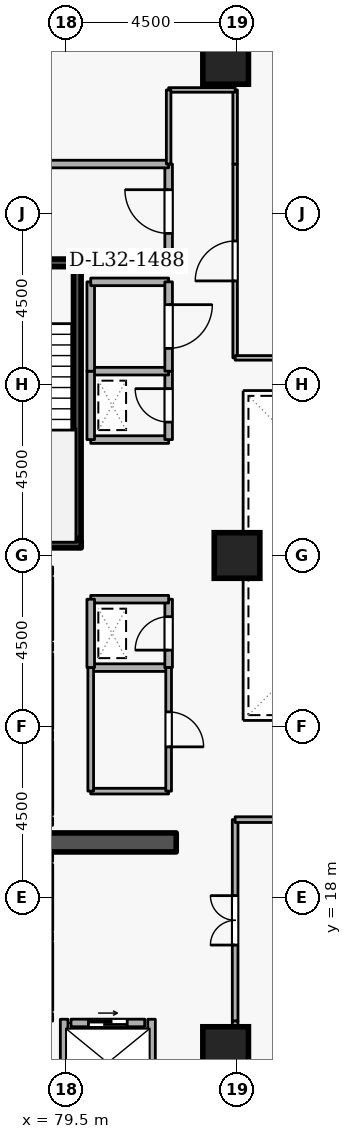
"""IFC4 building model, lengths in metres.
Left out: names, types, materials, properties, quantities, classifications, styles, units other than length and angle.
Written with IfcOpenShell. Run it as: python <this file> out.ifc"""

import sys

from ifc_helpers import new_model, si_unit, direction, frame, frame_2d, origin, origin_2d, place, context, subcontext, project, spatial, rectangle, extrude, element, fill, save


model = new_model("IFC4")
c1 = context("Model", 3, precision=1e-05, world=origin(), true_north=direction((0.0, 1.0)))
c2 = subcontext(c1, "Body", "Model", "MODEL_VIEW")
j1 = project(units=[si_unit("LENGTHUNIT", "METRE"), si_unit("PLANEANGLEUNIT", "RADIAN")], contexts=[c1])
p1 = place(None, origin())
s1 = spatial("IfcSite", under=j1, at=p1, CompositionType="ELEMENT")
p2 = place(p1, origin())
s2 = spatial("IfcBuilding", under=s1, at=p2, CompositionType="ELEMENT")
p3 = place(p2, frame((0.0, 0.0, 123.3)))
s3 = spatial("IfcBuildingStorey", under=s2, at=p3, CompositionType="ELEMENT", Elevation=123.3)
p4 = place(p3, frame((76.6, 19.45, 0.0), z_axis=(0.0, 0.0, 1.0), x_axis=(1.0, 0.0, 0.0)))
e1 = element("IfcWall", 1, at=p4, inside=s3, PredefinedType="SHEAR", context=c2, shape_type="SweptSolid", body=[
    extrude(rectangle(XDim=5.8, YDim=0.5, at=frame_2d((2.9, 0.0))), origin(), (0.0, 0.0, 1.0), 3.6),
])
for number, where, z_axis, x_axis in (
    (2, (83.7, 14.0, 0.0), (0.0, 0.0, 1.0), (1.0, 0.0, 0.0)),
    (3, (83.7, 40.0, 0.0), (0.0, 0.0, 1.0), (1.0, 0.0, 0.0)),
    (4, (84.0, 27.0, 0.0), (0.0, 0.0, 1.0), (1.0, 0.0, 0.0)),
):
    element("IfcColumn", number, at=place(p3, frame(where, z_axis=z_axis, x_axis=x_axis)), inside=s3, PredefinedType="COLUMN", context=c2, shape_type="SweptSolid", body=[
        extrude(rectangle(XDim=1.2, YDim=1.2, at=origin_2d()), origin(), (0.0, 0.0, 1.0), 3.6),
    ])
p5 = place(p3, frame((79.05, 24.78, 0.0), z_axis=(0.0, 0.0, 1.0), x_axis=(0.0, 1.0, 0.0)))
e5 = element("IfcWall", 5, at=p5, inside=s3, PredefinedType="STANDARD", context=c2, shape_type="SweptSolid", body=[
    extrude(rectangle(XDim=1.64, YDim=0.2, at=frame_2d((0.82, 0.0))), origin(), (0.0, 0.0, 1.0), 3.34),
])
p6 = place(p5, frame((0.31, 0.0, 0.0)))
e6 = element("IfcOpeningElement", 6, at=p6, cuts=e5, PredefinedType="OPENING", context=c2, shape_type="SweptSolid", body=[
    extrude(rectangle(XDim=1.02, YDim=2.06, at=frame_2d((0.51, 1.03))), frame((0.0, 0.11, 0.0), z_axis=(0.0, -1.0, 0.0), x_axis=(1.0, 0.0, 0.0)), (0.0, 0.0, 1.0), 0.22),
])
p7 = place(p3, frame((79.05, 22.43, 0.0), z_axis=(0.0, 0.0, 1.0), x_axis=(0.0, 1.0, 0.0)))
e7 = element("IfcWall", 7, at=p7, inside=s3, PredefinedType="STANDARD", context=c2, shape_type="SweptSolid", body=[
    extrude(rectangle(XDim=1.99, YDim=0.2, at=frame_2d((0.995, 0.0))), origin(), (0.0, 0.0, 1.0), 3.34),
])
p8 = place(p3, frame((79.05, 20.18, 0.0), z_axis=(0.0, 0.0, 1.0), x_axis=(0.0, 1.0, 0.0)))
e8 = element("IfcWall", 8, at=p8, inside=s3, PredefinedType="STANDARD", context=c2, shape_type="SweptSolid", body=[
    extrude(rectangle(XDim=1.94, YDim=0.2, at=frame_2d((0.97, 0.0))), origin(), (0.0, 0.0, 1.0), 3.34),
])
p9 = place(p3, frame((79.05, 17.13, 0.0), z_axis=(0.0, 0.0, 1.0), x_axis=(0.0, 1.0, 0.0)))
e9 = element("IfcWall", 9, at=p9, inside=s3, PredefinedType="STANDARD", context=c2, shape_type="SweptSolid", body=[
    extrude(rectangle(XDim=1.74, YDim=0.2, at=frame_2d((0.87, 0.0))), origin(), (0.0, 0.0, 1.0), 3.34),
])
p10 = place(p9, frame((0.36, 0.0, 0.0)))
e10 = element("IfcOpeningElement", 10, at=p10, cuts=e9, PredefinedType="OPENING", context=c2, shape_type="SweptSolid", body=[
    extrude(rectangle(XDim=1.02, YDim=2.06, at=frame_2d((0.51, 1.03))), frame((0.0, 0.11, 0.0), z_axis=(0.0, -1.0, 0.0), x_axis=(1.0, 0.0, 0.0)), (0.0, 0.0, 1.0), 0.22),
])
p11 = place(p3, frame((79.05, 15.03, 0.0), z_axis=(0.0, 0.0, 1.0), x_axis=(0.0, 1.0, 0.0)))
e11 = element("IfcWall", 11, at=p11, inside=s3, PredefinedType="STANDARD", context=c2, shape_type="SweptSolid", body=[
    extrude(rectangle(XDim=1.79, YDim=0.2, at=frame_2d((0.895, 0.0))), origin(), (0.0, 0.0, 1.0), 3.34),
])
p12 = place(p11, frame((0.385, 0.0, 0.0)))
e12 = element("IfcOpeningElement", 12, at=p12, cuts=e11, PredefinedType="OPENING", context=c2, shape_type="SweptSolid", body=[
    extrude(rectangle(XDim=1.02, YDim=2.06, at=frame_2d((0.51, 1.03))), frame((0.0, 0.11, 0.0), z_axis=(0.0, -1.0, 0.0), x_axis=(1.0, 0.0, 0.0)), (0.0, 0.0, 1.0), 0.22),
])
p13 = place(p3, frame((79.63, 14.7, 0.0), z_axis=(0.0, 0.0, 1.0), x_axis=(1.0, 0.0, 0.0)))
e13 = element("IfcWall", 13, at=p13, inside=s3, PredefinedType="STANDARD", context=c2, shape_type="SweptSolid", body=[
    extrude(rectangle(XDim=1.94, YDim=0.2, at=frame_2d((0.97, 0.0))), origin(), (0.0, 0.0, 1.0), 3.34),
])
p14 = place(p13, frame((0.46, 0.0, 0.0)))
e14 = element("IfcOpeningElement", 14, at=p14, cuts=e13, PredefinedType="OPENING", context=c2, shape_type="SweptSolid", body=[
    extrude(rectangle(XDim=1.02, YDim=2.06, at=frame_2d((0.51, 1.03))), frame((0.0, 0.11, 0.0), z_axis=(0.0, -1.0, 0.0), x_axis=(1.0, 0.0, 0.0)), (0.0, 0.0, 1.0), 0.22),
])
for number, where, z_axis, x_axis in (
    (15, (81.75, 12.612, 0.0), (0.0, 0.0, 1.0), (0.0, 1.0, 0.0)),
    (16, (79.45, 12.612, 0.0), (0.0, 0.0, 1.0), (0.0, 1.0, 0.0)),
):
    element("IfcWall", number, at=place(p3, frame(where, z_axis=z_axis, x_axis=x_axis)), inside=s3, PredefinedType="STANDARD", context=c2, shape_type="SweptSolid", body=[
        extrude(rectangle(XDim=2.186, YDim=0.2, at=frame_2d((1.093, 0.0))), origin(), (0.0, 0.0, 1.0), 3.34),
    ])
p15 = place(p3, frame((76.55, 34.7, 0.0), z_axis=(0.0, 0.0, 1.0), x_axis=(1.0, 0.0, 0.0)))
e17 = element("IfcWall", 17, at=p15, inside=s3, PredefinedType="SHEAR", context=c2, shape_type="SweptSolid", body=[
    extrude(rectangle(XDim=3.35, YDim=0.2, at=frame_2d((1.675, 0.0))), origin(), (0.0, 0.0, 1.0), 3.6),
])
p16 = place(p15, frame((1.125, 0.0, 0.0)))
e18 = element("IfcOpeningElement", 18, at=p16, cuts=e17, PredefinedType="OPENING", context=c2, shape_type="SweptSolid", body=[
    extrude(rectangle(XDim=1.1, YDim=2.1, at=frame_2d((0.55, 1.05))), frame((0.0, 0.11, 0.0), z_axis=(0.0, -1.0, 0.0), x_axis=(1.0, 0.0, 0.0)), (0.0, 0.0, 1.0), 0.22),
])
p17 = place(p3, frame((79.9, 27.3, 0.0), z_axis=(0.0, 0.0, 1.0), x_axis=(-1.0, 0.0, 0.0)))
e19 = element("IfcWall", 19, at=p17, inside=s3, PredefinedType="SHEAR", context=c2, shape_type="SweptSolid", body=[
    extrude(rectangle(XDim=3.35, YDim=0.2, at=frame_2d((1.675, 0.0))), origin(), (0.0, 0.0, 1.0), 3.6),
])
p18 = place(p3, frame((79.797, 27.45, 0.0), z_axis=(0.0, 0.0, 1.0), x_axis=(0.0, 1.0, 0.0)))
e20 = element("IfcWall", 20, at=p18, inside=s3, PredefinedType="SHEAR", context=c2, shape_type="SweptSolid", body=[
    extrude(rectangle(XDim=7.1, YDim=0.2, at=frame_2d((3.55, 0.0))), origin(), (0.0, 0.0, 1.0), 3.6),
])
p19 = place(p3, frame((79.9, 34.8, 0.0), z_axis=(0.0, 0.0, 1.0), x_axis=(1.0, 0.0, 0.0)))
e21 = element("IfcWall", 21, at=p19, inside=s3, PredefinedType="STANDARD", context=c2, shape_type="SweptSolid", body=[
    extrude(rectangle(XDim=2.3, YDim=0.2, at=frame_2d((1.15, 0.0))), origin(), (0.0, 0.0, 1.0), 2.545),
])
p20 = place(p3, frame((82.2, 34.8, 0.0), z_axis=(0.0, 0.0, 1.0), x_axis=(0.0, 1.0, 0.0)))
e22 = element("IfcWall", 22, at=p20, inside=s3, PredefinedType="STANDARD", context=c2, shape_type="SweptSolid", body=[
    extrude(rectangle(XDim=2.5, YDim=0.2, at=frame_2d((1.25, 0.0))), origin(), (0.0, 0.0, 1.0), 3.34),
])
p21 = place(p20, frame((0.675, 0.0, 0.0)))
e23 = element("IfcOpeningElement", 23, at=p21, cuts=e22, PredefinedType="OPENING", context=c2, shape_type="SweptSolid", body=[
    extrude(rectangle(XDim=1.15, YDim=2.1, at=frame_2d((0.575, 1.05))), frame((0.0, 0.11, 0.0), z_axis=(0.0, -1.0, 0.0), x_axis=(1.0, 0.0, 0.0)), (0.0, 0.0, 1.0), 0.22),
])
p22 = place(p3, frame((82.2, 37.3, 0.0), z_axis=(0.0, 0.0, 1.0), x_axis=(-1.0, 0.0, 0.0)))
e24 = element("IfcWall", 24, at=p22, inside=s3, PredefinedType="STANDARD", context=c2, shape_type="SweptSolid", body=[
    extrude(rectangle(XDim=5.7, YDim=0.2, at=frame_2d((2.85, 0.0))), origin(), (0.0, 0.0, 1.0), 3.34),
])
p23 = place(p3, frame((80.15, 24.05, 0.0), z_axis=(0.0, 0.0, 1.0), x_axis=(1.0, 0.0, 0.0)))
e25 = element("IfcWall", 25, at=p23, inside=s3, PredefinedType="STANDARD", context=c2, shape_type="SweptSolid", body=[
    extrude(rectangle(XDim=2.05, YDim=0.2, at=frame_2d((1.025, 0.0))), origin(), (0.0, 0.0, 1.0), 3.34),
])
p24 = place(p3, frame((82.2, 24.05, 0.0), z_axis=(0.0, 0.0, 1.0), x_axis=(0.0, 1.0, 0.0)))
e26 = element("IfcWall", 26, at=p24, inside=s3, PredefinedType="STANDARD", context=c2, shape_type="SweptSolid", body=[
    extrude(rectangle(XDim=1.8, YDim=0.2, at=frame_2d((0.9, 0.0))), origin(), (0.0, 0.0, 1.0), 3.34),
])
p25 = place(p24, frame((0.46, 0.0, 0.0)))
e27 = element("IfcOpeningElement", 27, at=p25, cuts=e26, PredefinedType="OPENING", context=c2, shape_type="SweptSolid", body=[
    extrude(rectangle(XDim=0.88, YDim=2.04, at=frame_2d((0.44, 1.02))), frame((0.0, 0.11, 0.0), z_axis=(0.0, -1.0, 0.0), x_axis=(1.0, 0.0, 0.0)), (0.0, 0.0, 1.0), 0.22),
])
p26 = place(p3, frame((82.2, 25.85, 0.0), z_axis=(0.0, 0.0, 1.0), x_axis=(-1.0, 0.0, 0.0)))
e28 = element("IfcWall", 28, at=p26, inside=s3, PredefinedType="STANDARD", context=c2, shape_type="SweptSolid", body=[
    extrude(rectangle(XDim=2.05, YDim=0.2, at=frame_2d((1.025, 0.0))), origin(), (0.0, 0.0, 1.0), 3.34),
])
p27 = place(p3, frame((80.15, 25.85, 0.0), z_axis=(0.0, 0.0, 1.0), x_axis=(0.0, -1.0, 0.0)))
e29 = element("IfcWall", 29, at=p27, inside=s3, PredefinedType="STANDARD", context=c2, shape_type="SweptSolid", body=[
    extrude(rectangle(XDim=1.8, YDim=0.2, at=frame_2d((0.9, 0.0))), origin(), (0.0, 0.0, 1.0), 3.34),
])
p28 = place(p3, frame((80.15, 30.05, 0.0), z_axis=(0.0, 0.0, 1.0), x_axis=(1.0, 0.0, 0.0)))
e30 = element("IfcWall", 30, at=p28, inside=s3, PredefinedType="STANDARD", context=c2, shape_type="SweptSolid", body=[
    extrude(rectangle(XDim=2.05, YDim=0.2, at=frame_2d((1.025, 0.0))), origin(), (0.0, 0.0, 1.0), 3.34),
])
p29 = place(p3, frame((82.2, 30.05, 0.0), z_axis=(0.0, 0.0, 1.0), x_axis=(0.0, 1.0, 0.0)))
e31 = element("IfcWall", 31, at=p29, inside=s3, PredefinedType="STANDARD", context=c2, shape_type="SweptSolid", body=[
    extrude(rectangle(XDim=1.8, YDim=0.2, at=frame_2d((0.9, 0.0))), origin(), (0.0, 0.0, 1.0), 3.34),
])
p30 = place(p29, frame((0.46, 0.0, 0.0)))
e32 = element("IfcOpeningElement", 32, at=p30, cuts=e31, PredefinedType="OPENING", context=c2, shape_type="SweptSolid", body=[
    extrude(rectangle(XDim=0.88, YDim=2.04, at=frame_2d((0.44, 1.02))), frame((0.0, 0.11, 0.0), z_axis=(0.0, -1.0, 0.0), x_axis=(1.0, 0.0, 0.0)), (0.0, 0.0, 1.0), 0.22),
])
p31 = place(p3, frame((82.2, 31.85, 0.0), z_axis=(0.0, 0.0, 1.0), x_axis=(-1.0, 0.0, 0.0)))
e33 = element("IfcWall", 33, at=p31, inside=s3, PredefinedType="STANDARD", context=c2, shape_type="SweptSolid", body=[
    extrude(rectangle(XDim=2.05, YDim=0.2, at=frame_2d((1.025, 0.0))), origin(), (0.0, 0.0, 1.0), 3.34),
])
p32 = place(p3, frame((80.15, 31.85, 0.0), z_axis=(0.0, 0.0, 1.0), x_axis=(0.0, -1.0, 0.0)))
e34 = element("IfcWall", 34, at=p32, inside=s3, PredefinedType="STANDARD", context=c2, shape_type="SweptSolid", body=[
    extrude(rectangle(XDim=1.8, YDim=0.2, at=frame_2d((0.9, 0.0))), origin(), (0.0, 0.0, 1.0), 3.34),
])
p33 = place(p3, frame((80.15, 31.85, 0.0), z_axis=(0.0, 0.0, 1.0), x_axis=(0.0, 1.0, 0.0)))
e35 = element("IfcWall", 35, at=p33, inside=s3, PredefinedType="STANDARD", context=c2, shape_type="SweptSolid", body=[
    extrude(rectangle(XDim=2.35, YDim=0.2, at=frame_2d((1.175, 0.0))), origin(), (0.0, 0.0, 1.0), 3.34),
])
p34 = place(p3, frame((80.15, 34.2, 0.0), z_axis=(0.0, 0.0, 1.0), x_axis=(1.0, 0.0, 0.0)))
e36 = element("IfcWall", 36, at=p34, inside=s3, PredefinedType="STANDARD", context=c2, shape_type="SweptSolid", body=[
    extrude(rectangle(XDim=2.05, YDim=0.2, at=frame_2d((1.025, 0.0))), origin(), (0.0, 0.0, 1.0), 2.545),
])
p35 = place(p3, frame((82.2, 34.2, 0.0), z_axis=(0.0, 0.0, 1.0), x_axis=(0.0, -1.0, 0.0)))
e37 = element("IfcWall", 37, at=p35, inside=s3, PredefinedType="STANDARD", context=c2, shape_type="SweptSolid", body=[
    extrude(rectangle(XDim=2.35, YDim=0.2, at=frame_2d((1.175, 0.0))), origin(), (0.0, 0.0, 1.0), 3.34),
])
p36 = place(p35, frame((0.6, 0.0, 0.0)))
e38 = element("IfcOpeningElement", 38, at=p36, cuts=e37, PredefinedType="OPENING", context=c2, shape_type="SweptSolid", body=[
    extrude(rectangle(XDim=1.15, YDim=2.1, at=frame_2d((0.575, 1.05))), frame((0.0, 0.11, 0.0), z_axis=(0.0, -1.0, 0.0), x_axis=(1.0, 0.0, 0.0)), (0.0, 0.0, 1.0), 0.22),
])
p37 = place(p3, frame((82.2, 20.8, 0.0), z_axis=(0.0, 0.0, 1.0), x_axis=(-1.0, 0.0, 0.0)))
e39 = element("IfcWall", 39, at=p37, inside=s3, PredefinedType="PARTITIONING", context=c2, shape_type="SweptSolid", body=[
    extrude(rectangle(XDim=2.05, YDim=0.15, at=frame_2d((1.025, 0.0))), origin(), (0.0, 0.0, 1.0), 3.34),
])
p38 = place(p3, frame((80.15, 20.8, 0.0), z_axis=(0.0, 0.0, 1.0), x_axis=(0.0, 1.0, 0.0)))
e40 = element("IfcWall", 40, at=p38, inside=s3, PredefinedType="PARTITIONING", context=c2, shape_type="SweptSolid", body=[
    extrude(rectangle(XDim=3.25, YDim=0.15, at=frame_2d((1.625, 0.0))), origin(), (0.0, 0.0, 1.0), 3.34),
])
p39 = place(p3, frame((82.2, 24.05, 0.0), z_axis=(0.0, 0.0, 1.0), x_axis=(0.0, -1.0, 0.0)))
e41 = element("IfcWall", 41, at=p39, inside=s3, PredefinedType="PARTITIONING", context=c2, shape_type="SweptSolid", body=[
    extrude(rectangle(XDim=3.25, YDim=0.15, at=frame_2d((1.625, 0.0))), origin(), (0.0, 0.0, 1.0), 3.34),
])
p40 = place(p39, frame((1.165, 0.0, 0.0)))
e42 = element("IfcOpeningElement", 42, at=p40, cuts=e41, PredefinedType="OPENING", context=c2, shape_type="SweptSolid", body=[
    extrude(rectangle(XDim=0.92, YDim=2.08, at=frame_2d((0.46, 1.04))), frame((0.0, 0.085, 0.0), z_axis=(0.0, -1.0, 0.0), x_axis=(1.0, 0.0, 0.0)), (0.0, 0.0, 1.0), 0.17),
])
p41 = place(p3, frame((83.95, 14.75, 0.0), z_axis=(0.0, 0.0, 1.0), x_axis=(0.0, 1.0, 0.0)))
e43 = element("IfcWall", 43, at=p41, inside=s3, PredefinedType="PARTITIONING", context=c2, shape_type="SweptSolid", body=[
    extrude(rectangle(XDim=5.3, YDim=0.15, at=frame_2d((2.65, 0.0))), origin(), (0.0, 0.0, 1.0), 3.34),
])
p42 = place(p41, frame((2.0, 0.0, 0.0)))
e44 = element("IfcOpeningElement", 44, at=p42, cuts=e43, PredefinedType="OPENING", context=c2, shape_type="SweptSolid", body=[
    extrude(rectangle(XDim=1.3, YDim=2.12, at=frame_2d((0.65, 1.06))), frame((0.0, 0.085, 0.0), z_axis=(0.0, -1.0, 0.0), x_axis=(1.0, 0.0, 0.0)), (0.0, 0.0, 1.0), 0.17),
])
p43 = place(p3, frame((83.95, 20.05, 0.0), z_axis=(0.0, 0.0, 1.0), x_axis=(1.0, 0.0, 0.0)))
e45 = element("IfcWall", 45, at=p43, inside=s3, PredefinedType="PARTITIONING", context=c2, shape_type="SweptSolid", body=[
    extrude(rectangle(XDim=4.55, YDim=0.15, at=frame_2d((2.275, 0.0))), origin(), (0.0, 0.0, 1.0), 3.34),
])
p44 = place(p3, frame((83.95, 12.4, 0.0), z_axis=(0.0, 0.0, 1.0), x_axis=(0.0, 1.0, 0.0)))
e46 = element("IfcWall", 46, at=p44, inside=s3, PredefinedType="PARTITIONING", context=c2, shape_type="SweptSolid", body=[
    extrude(rectangle(XDim=2.35, YDim=0.15, at=frame_2d((1.175, 0.0))), origin(), (0.0, 0.0, 1.0), 3.34),
])
p45 = place(p3, frame((83.95, 32.2, 0.0), z_axis=(0.0, 0.0, 1.0), x_axis=(0.0, 1.0, 0.0)))
e47 = element("IfcWall", 47, at=p45, inside=s3, PredefinedType="PARTITIONING", context=c2, shape_type="SweptSolid", body=[
    extrude(rectangle(XDim=5.1, YDim=0.12, at=frame_2d((2.55, 0.0))), origin(), (0.0, 0.0, 1.0), 3.34),
])
p46 = place(p45, frame((2.025, 0.0, 0.0)))
e48 = element("IfcOpeningElement", 48, at=p46, cuts=e47, PredefinedType="OPENING", context=c2, shape_type="SweptSolid", body=[
    extrude(rectangle(XDim=1.05, YDim=2.1, at=frame_2d((0.525, 1.05))), frame((0.0, 0.07, 0.0), z_axis=(0.0, -1.0, 0.0), x_axis=(1.0, 0.0, 0.0)), (0.0, 0.0, 1.0), 0.14),
])
p47 = place(p3, frame((83.95, 37.3, 0.0), z_axis=(0.0, 0.0, 1.0), x_axis=(0.0, 1.0, 0.0)))
e49 = element("IfcWall", 49, at=p47, inside=s3, PredefinedType="PARTITIONING", context=c2, shape_type="SweptSolid", body=[
    extrude(rectangle(XDim=1.95, YDim=0.12, at=frame_2d((0.975, 0.0))), origin(), (0.0, 0.0, 1.0), 3.34),
])
p48 = place(p3, frame((83.95, 39.25, 0.0), z_axis=(0.0, 0.0, 1.0), x_axis=(-1.0, 0.0, 0.0)))
e50 = element("IfcWall", 50, at=p48, inside=s3, PredefinedType="PARTITIONING", context=c2, shape_type="SweptSolid", body=[
    extrude(rectangle(XDim=1.75, YDim=0.12, at=frame_2d((0.875, 0.0))), origin(), (0.0, 0.0, 1.0), 3.34),
])
p49 = place(p3, frame((82.2, 39.25, 0.0), z_axis=(0.0, 0.0, 1.0), x_axis=(0.0, -1.0, 0.0)))
e51 = element("IfcWall", 51, at=p49, inside=s3, PredefinedType="PARTITIONING", context=c2, shape_type="SweptSolid", body=[
    extrude(rectangle(XDim=1.95, YDim=0.12, at=frame_2d((0.975, 0.0))), origin(), (0.0, 0.0, 1.0), 3.34),
])
p50 = place(p3, frame((88.5, 32.2, 0.0), z_axis=(0.0, 0.0, 1.0), x_axis=(-1.0, 0.0, 0.0)))
e52 = element("IfcWall", 52, at=p50, inside=s3, PredefinedType="PARTITIONING", context=c2, shape_type="SweptSolid", body=[
    extrude(rectangle(XDim=4.55, YDim=0.12, at=frame_2d((2.275, 0.0))), origin(), (0.0, 0.0, 1.0), 3.34),
])
p51 = place(p14, origin())
e53 = element("IfcDoor", 53, at=p51, inside=s3, OperationType="SLIDING_TO_LEFT", PredefinedType="DOOR", context=c2, shape_type="SweptSolid", body=[
    extrude(rectangle(XDim=1.02, YDim=2.06, at=frame_2d((0.51, 1.03))), frame((0.0, 0.025, 0.0), z_axis=(0.0, -1.0, 0.0), x_axis=(1.0, 0.0, 0.0)), (0.0, 0.0, 1.0), 0.05),
])
fill(e14, e53)
p52 = place(p21, origin())
e54 = element("IfcDoor", 54, at=p52, inside=s3, OperationType="SINGLE_SWING_RIGHT", PredefinedType="DOOR", context=c2, shape_type="SweptSolid", body=[
    extrude(rectangle(XDim=1.15, YDim=2.1, at=frame_2d((0.575, 1.05))), frame((0.0, 0.025, 0.0), z_axis=(0.0, -1.0, 0.0), x_axis=(1.0, 0.0, 0.0)), (0.0, 0.0, 1.0), 0.05),
])
fill(e23, e54)
p53 = place(p25, origin())
e55 = element("IfcDoor", 55, at=p53, inside=s3, OperationType="SINGLE_SWING_LEFT", PredefinedType="DOOR", context=c2, shape_type="SweptSolid", body=[
    extrude(rectangle(XDim=0.88, YDim=2.04, at=frame_2d((0.44, 1.02))), frame((0.0, 0.025, 0.0), z_axis=(0.0, -1.0, 0.0), x_axis=(1.0, 0.0, 0.0)), (0.0, 0.0, 1.0), 0.05),
])
fill(e27, e55)
p54 = place(p30, origin())
e56 = element("IfcDoor", 56, at=p54, inside=s3, OperationType="SINGLE_SWING_RIGHT", PredefinedType="DOOR", context=c2, shape_type="SweptSolid", body=[
    extrude(rectangle(XDim=0.88, YDim=2.04, at=frame_2d((0.44, 1.02))), frame((0.0, 0.025, 0.0), z_axis=(0.0, -1.0, 0.0), x_axis=(1.0, 0.0, 0.0)), (0.0, 0.0, 1.0), 0.05),
])
fill(e32, e56)
p55 = place(p40, origin())
e57 = element("IfcDoor", 57, at=p55, inside=s3, OperationType="SINGLE_SWING_RIGHT", PredefinedType="DOOR", context=c2, shape_type="SweptSolid", body=[
    extrude(rectangle(XDim=0.92, YDim=2.08, at=frame_2d((0.46, 1.04))), frame((0.0, 0.025, 0.0), z_axis=(0.0, -1.0, 0.0), x_axis=(1.0, 0.0, 0.0)), (0.0, 0.0, 1.0), 0.05),
])
fill(e42, e57)
p56 = place(p36, origin())
e58 = element("IfcDoor", 58, at=p56, inside=s3, OperationType="SINGLE_SWING_LEFT", PredefinedType="DOOR", context=c2, shape_type="SweptSolid", body=[
    extrude(rectangle(XDim=1.15, YDim=2.1, at=frame_2d((0.575, 1.05))), frame((0.0, 0.025, 0.0), z_axis=(0.0, -1.0, 0.0), x_axis=(1.0, 0.0, 0.0)), (0.0, 0.0, 1.0), 0.05),
])
fill(e38, e58)
p57 = place(p42, origin())
e59 = element("IfcDoor", 59, at=p57, inside=s3, OperationType="DOUBLE_DOOR_SINGLE_SWING", PredefinedType="DOOR", context=c2, shape_type="SweptSolid", body=[
    extrude(rectangle(XDim=1.3, YDim=2.12, at=frame_2d((0.65, 1.06))), frame((0.0, 0.025, 0.0), z_axis=(0.0, -1.0, 0.0), x_axis=(1.0, 0.0, 0.0)), (0.0, 0.0, 1.0), 0.05),
])
fill(e44, e59)
p58 = place(p46, origin())
e60 = element("IfcDoor", 60, at=p58, inside=s3, OperationType="SINGLE_SWING_LEFT", PredefinedType="DOOR", context=c2, shape_type="SweptSolid", body=[
    extrude(rectangle(XDim=1.05, YDim=2.1, at=frame_2d((0.525, 1.05))), frame((0.0, 0.025, 0.0), z_axis=(0.0, -1.0, 0.0), x_axis=(1.0, 0.0, 0.0)), (0.0, 0.0, 1.0), 0.05),
])
fill(e48, e60)
save(model, sys.argv[1])
